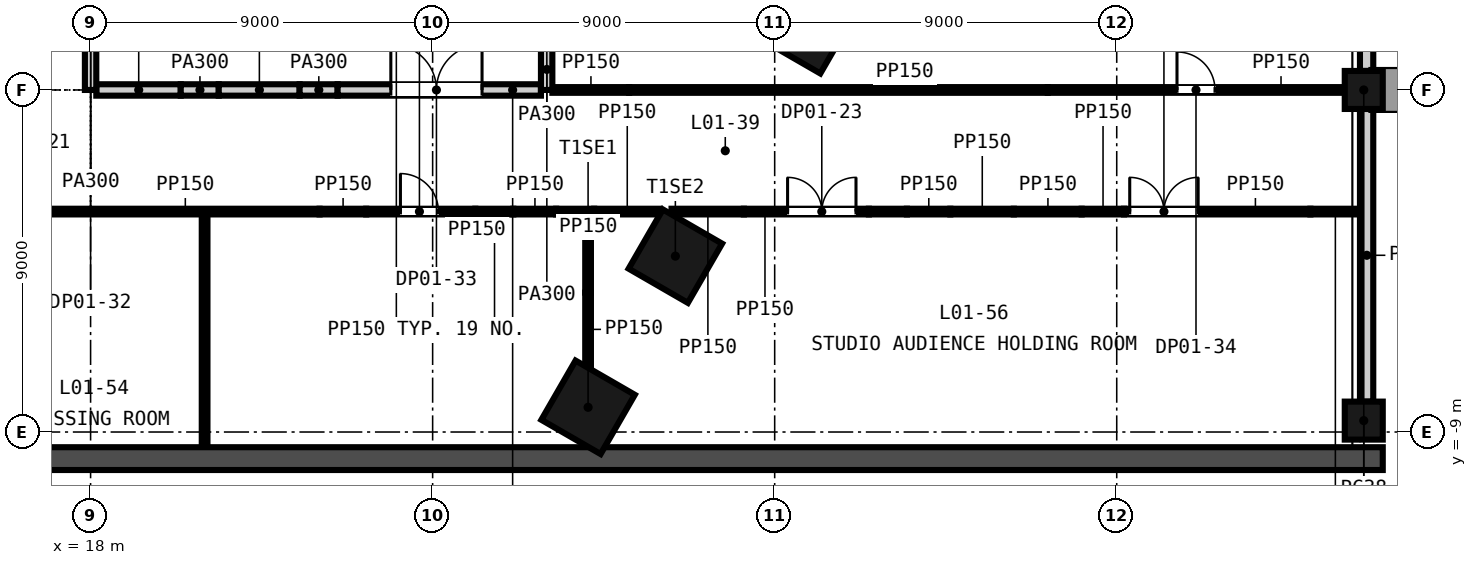
"""IFC4 building model, lengths in metres.
Left out: names, types, materials, properties, quantities, classifications, styles, units other than length and angle.
Written with IfcOpenShell. Run it as: python <this file> out.ifc"""

import sys

from ifc_helpers import new_model, si_unit, direction, frame, frame_2d, origin, origin_2d, place, context, subcontext, project, spatial, rectangle, extrude, element, fill, save


model = new_model("IFC4")
c1 = context("Model", 3, precision=1e-05, world=origin(), true_north=direction((0.0, 1.0)))
c2 = subcontext(c1, "Body", "Model", "MODEL_VIEW")
j1 = project(units=[si_unit("LENGTHUNIT", "METRE"), si_unit("PLANEANGLEUNIT", "RADIAN")], contexts=[c1])
p1 = place(None, origin())
s1 = spatial("IfcSite", under=j1, at=p1, CompositionType="ELEMENT")
p2 = place(p1, origin())
s2 = spatial("IfcBuilding", under=s1, at=p2, CompositionType="ELEMENT")
p3 = place(p2, frame((0.0, 0.0, 9.0)))
s3 = spatial("IfcBuildingStorey", under=s2, at=p3, CompositionType="ELEMENT", Elevation=9.0)
for number, where, z_axis, x_axis in (
    (1, (31.09, -8.35, -0.4), (0.0, 0.0, 1.0), (0.5, 0.866, 0.0)),
    (2, (33.387, -4.373, -0.4), (0.0, 0.0, 1.0), (0.5, 0.866, 0.0)),
    (3, (36.872, 1.663, -0.4), (0.0, 0.0, 1.0), (0.5, 0.866, 0.0)),
):
    element("IfcColumn", number, at=place(p3, frame(where, z_axis=z_axis, x_axis=x_axis)), inside=s3, PredefinedType="COLUMN", context=c2, shape_type="SweptSolid", body=[
        extrude(rectangle(XDim=1.8, YDim=1.8, at=origin_2d()), origin(), (0.0, 0.0, 1.0), 9.0),
    ])
for number, where, z_axis, x_axis in (
    (4, (51.5, 0.0, -0.4), (0.0, 0.0, 1.0), (0.0, 1.0, 0.0)),
    (5, (51.5, -8.7, -0.4), (0.0, 0.0, 1.0), (0.0, 1.0, 0.0)),
):
    element("IfcColumn", number, at=place(p3, frame(where, z_axis=z_axis, x_axis=x_axis)), inside=s3, PredefinedType="COLUMN", context=c2, shape_type="SweptSolid", body=[
        extrude(rectangle(XDim=1.0, YDim=1.0, at=origin_2d()), origin(), (0.0, 0.0, 1.0), 9.0),
    ])
p4 = place(p3, frame((-52.0, -9.7, -0.4), z_axis=(0.0, 0.0, 1.0), x_axis=(1.0, 0.0, 0.0)))
e6 = element("IfcWall", 6, at=p4, inside=s3, PredefinedType="SOLIDWALL", context=c2, shape_type="SweptSolid", body=[
    extrude(rectangle(XDim=104.0, YDim=0.6, at=frame_2d((52.0, 0.0))), origin(), (0.0, 0.0, 1.0), 9.0),
])
p5 = place(p3, frame((51.575, -8.2, -0.4), z_axis=(0.0, 0.0, 1.0), x_axis=(0.0, 1.0, 0.0)))
e7 = element("IfcWall", 7, at=p5, inside=s3, PredefinedType="SOLIDWALL", context=c2, shape_type="SweptSolid", body=[
    extrude(rectangle(XDim=7.7, YDim=0.35, at=frame_2d((3.85, 0.0))), origin(), (0.0, 0.0, 1.0), 8.1),
])
p6 = place(p3, frame((51.575, 0.5, -0.4), z_axis=(0.0, 0.0, 1.0), x_axis=(0.0, 1.0, 0.0)))
e8 = element("IfcWall", 8, at=p6, inside=s3, PredefinedType="SOLIDWALL", context=c2, shape_type="SweptSolid", body=[
    extrude(rectangle(XDim=7.75, YDim=0.35, at=frame_2d((3.875, 0.0))), origin(), (0.0, 0.0, 1.0), 8.1),
])
p7 = place(p3, frame((-17.925, -3.2, 0.0), z_axis=(0.0, 0.0, 1.0), x_axis=(1.0, 0.0, 0.0)))
e9 = element("IfcWall", 9, at=p7, inside=s3, PredefinedType="PARTITIONING", context=c2, shape_type="SweptSolid", body=[
    extrude(rectangle(XDim=41.95, YDim=0.15, at=frame_2d((20.975, 0.0))), origin(), (0.0, 0.0, 1.0), 8.6),
])
p8 = place(p7, frame((4.325, 0.0, 0.0)))
e10 = element("IfcOpeningElement", 10, at=p8, cuts=e9, PredefinedType="OPENING", context=c2, shape_type="SweptSolid", body=[
    extrude(rectangle(XDim=1.0, YDim=2.1, at=frame_2d((0.5, 1.05))), frame((0.0, 0.085, 0.0), z_axis=(0.0, -1.0, 0.0), x_axis=(1.0, 0.0, 0.0)), (0.0, 0.0, 1.0), 0.17),
])
p9 = place(p7, frame((11.325, 0.0, 0.0)))
e11 = element("IfcOpeningElement", 11, at=p9, cuts=e9, PredefinedType="OPENING", context=c2, shape_type="SweptSolid", body=[
    extrude(rectangle(XDim=1.0, YDim=2.1, at=frame_2d((0.5, 1.05))), frame((0.0, 0.085, 0.0), z_axis=(0.0, -1.0, 0.0), x_axis=(1.0, 0.0, 0.0)), (0.0, 0.0, 1.0), 0.17),
])
p10 = place(p7, frame((17.325, 0.0, 0.0)))
e12 = element("IfcOpeningElement", 12, at=p10, cuts=e9, PredefinedType="OPENING", context=c2, shape_type="SweptSolid", body=[
    extrude(rectangle(XDim=1.0, YDim=2.1, at=frame_2d((0.5, 1.05))), frame((0.0, 0.085, 0.0), z_axis=(0.0, -1.0, 0.0), x_axis=(1.0, 0.0, 0.0)), (0.0, 0.0, 1.0), 0.17),
])
p11 = place(p7, frame((21.825, 0.0, 0.0)))
e13 = element("IfcOpeningElement", 13, at=p11, cuts=e9, PredefinedType="OPENING", context=c2, shape_type="SweptSolid", body=[
    extrude(rectangle(XDim=1.0, YDim=2.1, at=frame_2d((0.5, 1.05))), frame((0.0, 0.085, 0.0), z_axis=(0.0, -1.0, 0.0), x_axis=(1.0, 0.0, 0.0)), (0.0, 0.0, 1.0), 0.17),
])
p12 = place(p7, frame((24.825, 0.0, 0.0)))
e14 = element("IfcOpeningElement", 14, at=p12, cuts=e9, PredefinedType="OPENING", context=c2, shape_type="SweptSolid", body=[
    extrude(rectangle(XDim=1.0, YDim=2.1, at=frame_2d((0.5, 1.05))), frame((0.0, 0.085, 0.0), z_axis=(0.0, -1.0, 0.0), x_axis=(1.0, 0.0, 0.0)), (0.0, 0.0, 1.0), 0.17),
])
p13 = place(p7, frame((29.325, 0.0, 0.0)))
e15 = element("IfcOpeningElement", 15, at=p13, cuts=e9, PredefinedType="OPENING", context=c2, shape_type="SweptSolid", body=[
    extrude(rectangle(XDim=1.0, YDim=2.1, at=frame_2d((0.5, 1.05))), frame((0.0, 0.085, 0.0), z_axis=(0.0, -1.0, 0.0), x_axis=(1.0, 0.0, 0.0)), (0.0, 0.0, 1.0), 0.17),
])
p14 = place(p7, frame((33.825, 0.0, 0.0)))
e16 = element("IfcOpeningElement", 16, at=p14, cuts=e9, PredefinedType="OPENING", context=c2, shape_type="SweptSolid", body=[
    extrude(rectangle(XDim=1.0, YDim=2.1, at=frame_2d((0.5, 1.05))), frame((0.0, 0.085, 0.0), z_axis=(0.0, -1.0, 0.0), x_axis=(1.0, 0.0, 0.0)), (0.0, 0.0, 1.0), 0.17),
])
p15 = place(p3, frame((24.025, -3.2, 0.0), z_axis=(0.0, 0.0, 1.0), x_axis=(1.0, 0.0, 0.0)))
e17 = element("IfcWall", 17, at=p15, inside=s3, PredefinedType="PARTITIONING", context=c2, shape_type="SweptSolid", body=[
    extrude(rectangle(XDim=1.227, YDim=0.15, at=frame_2d((0.614, 0.0))), origin(), (0.0, 0.0, 1.0), 7.851),
])
p16 = place(p3, frame((25.252, -3.2, 0.0), z_axis=(0.0, 0.0, 1.0), x_axis=(1.0, 0.0, 0.0)))
e18 = element("IfcWall", 18, at=p16, inside=s3, PredefinedType="PARTITIONING", context=c2, shape_type="SweptSolid", body=[
    extrude(rectangle(XDim=2.871, YDim=0.15, at=frame_2d((1.436, 0.0))), origin(), (0.0, 0.0, 1.0), 8.6),
])
p17 = place(p16, frame((0.9, 0.0, 0.0)))
e19 = element("IfcOpeningElement", 19, at=p17, cuts=e18, PredefinedType="OPENING", context=c2, shape_type="SweptSolid", body=[
    extrude(rectangle(XDim=1.0, YDim=2.1, at=frame_2d((0.5, 1.05))), frame((0.0, 0.085, 0.0), z_axis=(0.0, -1.0, 0.0), x_axis=(1.0, 0.0, 0.0)), (0.0, 0.0, 1.0), 0.17),
])
p18 = place(p3, frame((28.123, -3.2, 0.0), z_axis=(0.0, 0.0, 1.0), x_axis=(1.0, 0.0, 0.0)))
e20 = element("IfcWall", 20, at=p18, inside=s3, PredefinedType="PARTITIONING", context=c2, shape_type="SweptSolid", body=[
    extrude(rectangle(XDim=1.0, YDim=0.15, at=frame_2d((0.5, 0.0))), origin(), (0.0, 0.0, 1.0), 7.851),
])
p19 = place(p3, frame((29.123, -3.2, 0.0), z_axis=(0.0, 0.0, 1.0), x_axis=(1.0, 0.0, 0.0)))
e21 = element("IfcWall", 21, at=p19, inside=s3, PredefinedType="PARTITIONING", context=c2, shape_type="SweptSolid", body=[
    extrude(rectangle(XDim=1.127, YDim=0.15, at=frame_2d((0.563, 0.0))), origin(), (0.0, 0.0, 1.0), 8.6),
])
p20 = place(p3, frame((30.25, -3.2, 0.0), z_axis=(0.0, 0.0, 1.0), x_axis=(1.0, 0.0, 0.0)))
e22 = element("IfcWall", 22, at=p20, inside=s3, PredefinedType="PARTITIONING", context=c2, shape_type="SweptSolid", body=[
    extrude(rectangle(XDim=1.0, YDim=0.15, at=frame_2d((0.5, 0.0))), origin(), (0.0, 0.0, 1.0), 7.841),
])
p21 = place(p3, frame((31.25, -3.2, 0.0), z_axis=(0.0, 0.0, 1.0), x_axis=(1.0, 0.0, 0.0)))
e23 = element("IfcWall", 23, at=p21, inside=s3, PredefinedType="PARTITIONING", context=c2, shape_type="SweptSolid", body=[
    extrude(rectangle(XDim=1.731, YDim=0.15, at=frame_2d((0.865, 0.0))), origin(), (0.0, 0.0, 1.0), 7.841),
])
p22 = place(p3, frame((33.286, -3.2, 0.0), z_axis=(0.0, 0.0, 1.0), x_axis=(1.0, 0.0, 0.0)))
e24 = element("IfcWall", 24, at=p22, inside=s3, PredefinedType="PARTITIONING", context=c2, shape_type="SweptSolid", body=[
    extrude(rectangle(XDim=1.904, YDim=0.15, at=frame_2d((0.952, 0.0))), origin(), (0.0, 0.0, 1.0), 7.6),
])
p23 = place(p3, frame((35.189, -3.2, 0.0), z_axis=(0.0, 0.0, 1.0), x_axis=(1.0, 0.0, 0.0)))
e25 = element("IfcWall", 25, at=p23, inside=s3, PredefinedType="PARTITIONING", context=c2, shape_type="SweptSolid", body=[
    extrude(rectangle(XDim=3.289, YDim=0.15, at=frame_2d((1.645, 0.0))), origin(), (0.0, 0.0, 1.0), 8.6),
])
p24 = place(p23, frame((1.15, 0.0, 0.0)))
e26 = element("IfcOpeningElement", 26, at=p24, cuts=e25, PredefinedType="OPENING", context=c2, shape_type="SweptSolid", body=[
    extrude(rectangle(XDim=1.8, YDim=2.4, at=frame_2d((0.9, 1.2))), frame((0.0, 0.085, 0.0), z_axis=(0.0, -1.0, 0.0), x_axis=(1.0, 0.0, 0.0)), (0.0, 0.0, 1.0), 0.17),
])
p25 = place(p3, frame((38.479, -3.2, 0.0), z_axis=(0.0, 0.0, 1.0), x_axis=(1.0, 0.0, 0.0)))
e27 = element("IfcWall", 27, at=p25, inside=s3, PredefinedType="PARTITIONING", context=c2, shape_type="SweptSolid", body=[
    extrude(rectangle(XDim=1.0, YDim=0.15, at=frame_2d((0.5, 0.0))), origin(), (0.0, 0.0, 1.0), 7.921),
])
p26 = place(p3, frame((39.479, -3.2, 0.0), z_axis=(0.0, 0.0, 1.0), x_axis=(1.0, 0.0, 0.0)))
e28 = element("IfcWall", 28, at=p26, inside=s3, PredefinedType="PARTITIONING", context=c2, shape_type="SweptSolid", body=[
    extrude(rectangle(XDim=1.143, YDim=0.15, at=frame_2d((0.572, 0.0))), origin(), (0.0, 0.0, 1.0), 7.841),
])
p27 = place(p3, frame((40.622, -3.2, 0.0), z_axis=(0.0, 0.0, 1.0), x_axis=(1.0, 0.0, 0.0)))
e29 = element("IfcWall", 29, at=p27, inside=s3, PredefinedType="PARTITIONING", context=c2, shape_type="SweptSolid", body=[
    extrude(rectangle(XDim=1.67, YDim=0.15, at=frame_2d((0.835, 0.0))), origin(), (0.0, 0.0, 1.0), 7.765),
])
p28 = place(p3, frame((42.292, -3.2, 0.0), z_axis=(0.0, 0.0, 1.0), x_axis=(1.0, 0.0, 0.0)))
e30 = element("IfcWall", 30, at=p28, inside=s3, PredefinedType="PARTITIONING", context=c2, shape_type="SweptSolid", body=[
    extrude(rectangle(XDim=1.785, YDim=0.15, at=frame_2d((0.893, 0.0))), origin(), (0.0, 0.0, 1.0), 8.6),
])
p29 = place(p3, frame((44.077, -3.2, 0.0), z_axis=(0.0, 0.0, 1.0), x_axis=(1.0, 0.0, 0.0)))
e31 = element("IfcWall", 31, at=p29, inside=s3, PredefinedType="PARTITIONING", context=c2, shape_type="SweptSolid", body=[
    extrude(rectangle(XDim=1.115, YDim=0.15, at=frame_2d((0.557, 0.0))), origin(), (0.0, 0.0, 1.0), 7.841),
])
p30 = place(p3, frame((45.192, -3.2, 0.0), z_axis=(0.0, 0.0, 1.0), x_axis=(1.0, 0.0, 0.0)))
e32 = element("IfcWall", 32, at=p30, inside=s3, PredefinedType="PARTITIONING", context=c2, shape_type="SweptSolid", body=[
    extrude(rectangle(XDim=4.904, YDim=0.15, at=frame_2d((2.452, 0.0))), origin(), (0.0, 0.0, 1.0), 8.6),
])
p31 = place(p30, frame((0.15, 0.0, 0.0)))
e33 = element("IfcOpeningElement", 33, at=p31, cuts=e32, PredefinedType="OPENING", context=c2, shape_type="SweptSolid", body=[
    extrude(rectangle(XDim=1.8, YDim=2.4, at=frame_2d((0.9, 1.2))), frame((0.0, 0.085, 0.0), z_axis=(0.0, -1.0, 0.0), x_axis=(1.0, 0.0, 0.0)), (0.0, 0.0, 1.0), 0.17),
])
p32 = place(p3, frame((50.096, -3.2, 0.0), z_axis=(0.0, 0.0, 1.0), x_axis=(1.0, 0.0, 0.0)))
e34 = element("IfcWall", 34, at=p32, inside=s3, PredefinedType="PARTITIONING", context=c2, shape_type="SweptSolid", body=[
    extrude(rectangle(XDim=1.304, YDim=0.15, at=frame_2d((0.652, 0.0))), origin(), (0.0, 0.0, 1.0), 7.841),
])
p33 = place(p3, frame((18.15, 0.0, 0.0), z_axis=(0.0, 0.0, 1.0), x_axis=(1.0, 0.0, 0.0)))
e35 = element("IfcWall", 35, at=p33, inside=s3, PredefinedType="PARTITIONING", context=c2, shape_type="SweptSolid", body=[
    extrude(rectangle(XDim=2.222, YDim=0.3, at=frame_2d((1.111, 0.0))), origin(), (0.0, 0.0, 1.0), 8.6),
])
p34 = place(p3, frame((20.372, 0.0, 0.0), z_axis=(0.0, 0.0, 1.0), x_axis=(1.0, 0.0, 0.0)))
e36 = element("IfcWall", 36, at=p34, inside=s3, PredefinedType="PARTITIONING", context=c2, shape_type="SweptSolid", body=[
    extrude(rectangle(XDim=1.0, YDim=0.3, at=frame_2d((0.5, 0.0))), origin(), (0.0, 0.0, 1.0), 7.765),
])
p35 = place(p3, frame((21.372, 0.0, 0.0), z_axis=(0.0, 0.0, 1.0), x_axis=(1.0, 0.0, 0.0)))
e37 = element("IfcWall", 37, at=p35, inside=s3, PredefinedType="PARTITIONING", context=c2, shape_type="SweptSolid", body=[
    extrude(rectangle(XDim=2.128, YDim=0.3, at=frame_2d((1.064, 0.0))), origin(), (0.0, 0.0, 1.0), 8.6),
])
p36 = place(p3, frame((23.5, 0.0, 0.0), z_axis=(0.0, 0.0, 1.0), x_axis=(1.0, 0.0, 0.0)))
e38 = element("IfcWall", 38, at=p36, inside=s3, PredefinedType="PARTITIONING", context=c2, shape_type="SweptSolid", body=[
    extrude(rectangle(XDim=1.0, YDim=0.3, at=frame_2d((0.5, 0.0))), origin(), (0.0, 0.0, 1.0), 7.765),
])
p37 = place(p3, frame((24.5, 0.0, 0.0), z_axis=(0.0, 0.0, 1.0), x_axis=(1.0, 0.0, 0.0)))
e39 = element("IfcWall", 39, at=p37, inside=s3, PredefinedType="PARTITIONING", context=c2, shape_type="SweptSolid", body=[
    extrude(rectangle(XDim=5.35, YDim=0.3, at=frame_2d((2.675, 0.0))), origin(), (0.0, 0.0, 1.0), 8.6),
])
p38 = place(p37, frame((1.4, 0.0, 0.0)))
e40 = element("IfcOpeningElement", 40, at=p38, cuts=e39, PredefinedType="OPENING", context=c2, shape_type="SweptSolid", body=[
    extrude(rectangle(XDim=2.4, YDim=2.4, at=frame_2d((1.2, 1.2))), frame((0.0, 0.16, 0.0), z_axis=(0.0, -1.0, 0.0), x_axis=(1.0, 0.0, 0.0)), (0.0, 0.0, 1.0), 0.32),
])
p39 = place(p3, frame((30.15, 0.0, 0.0), z_axis=(0.0, 0.0, 1.0), x_axis=(1.0, 0.0, 0.0)))
e41 = element("IfcWall", 41, at=p39, inside=s3, PredefinedType="PARTITIONING", context=c2, shape_type="SweptSolid", body=[
    extrude(rectangle(XDim=2.021, YDim=0.15, at=frame_2d((1.01, 0.0))), origin(), (0.0, 0.0, 1.0), 8.6),
])
p40 = place(p3, frame((32.171, 0.0, 0.0), z_axis=(0.0, 0.0, 1.0), x_axis=(1.0, 0.0, 0.0)))
e42 = element("IfcWall", 42, at=p40, inside=s3, PredefinedType="PARTITIONING", context=c2, shape_type="SweptSolid", body=[
    extrude(rectangle(XDim=11.015, YDim=0.15, at=frame_2d((5.508, 0.0))), origin(), (0.0, 0.0, 1.0), 7.6),
])
p41 = place(p3, frame((43.186, 0.0, 0.0), z_axis=(0.0, 0.0, 1.0), x_axis=(1.0, 0.0, 0.0)))
e43 = element("IfcWall", 43, at=p41, inside=s3, PredefinedType="PARTITIONING", context=c2, shape_type="SweptSolid", body=[
    extrude(rectangle(XDim=7.814, YDim=0.15, at=frame_2d((3.907, 0.0))), origin(), (0.0, 0.0, 1.0), 8.6),
])
p42 = place(p41, frame((3.4, 0.0, 0.0)))
e44 = element("IfcOpeningElement", 44, at=p42, cuts=e43, PredefinedType="OPENING", context=c2, shape_type="SweptSolid", body=[
    extrude(rectangle(XDim=1.0, YDim=2.1, at=frame_2d((0.5, 1.05))), frame((0.0, 0.085, 0.0), z_axis=(0.0, -1.0, 0.0), x_axis=(1.0, 0.0, 0.0)), (0.0, 0.0, 1.0), 0.17),
])
p43 = place(p3, frame((18.0, 0.0, 0.0), z_axis=(0.0, 0.0, 1.0), x_axis=(0.0, 1.0, 0.0)))
e45 = element("IfcWall", 45, at=p43, inside=s3, PredefinedType="PARTITIONING", context=c2, shape_type="SweptSolid", body=[
    extrude(rectangle(XDim=7.0, YDim=0.3, at=frame_2d((3.5, 0.0))), origin(), (0.0, 0.0, 1.0), 8.6),
])
p44 = place(p43, frame((2.4, 0.0, 0.0)))
e46 = element("IfcOpeningElement", 46, at=p44, cuts=e45, PredefinedType="OPENING", context=c2, shape_type="SweptSolid", body=[
    extrude(rectangle(XDim=2.4, YDim=2.4, at=frame_2d((1.2, 1.2))), frame((0.0, 0.16, 0.0), z_axis=(0.0, -1.0, 0.0), x_axis=(1.0, 0.0, 0.0)), (0.0, 0.0, 1.0), 0.32),
])
p45 = place(p3, frame((21.0, -9.4, 0.0), z_axis=(0.0, 0.0, 1.0), x_axis=(0.0, 1.0, 0.0)))
e47 = element("IfcWall", 47, at=p45, inside=s3, PredefinedType="PARTITIONING", context=c2, shape_type="SweptSolid", body=[
    extrude(rectangle(XDim=6.125, YDim=0.15, at=frame_2d((3.062, 0.0))), origin(), (0.0, 0.0, 1.0), 7.765),
])
p46 = place(p3, frame((30.0, 0.0, 0.0), z_axis=(0.0, 0.0, 1.0), x_axis=(0.0, 1.0, 0.0)))
e48 = element("IfcWall", 48, at=p46, inside=s3, PredefinedType="PARTITIONING", context=c2, shape_type="SweptSolid", body=[
    extrude(rectangle(XDim=1.08, YDim=0.3, at=frame_2d((0.54, 0.0))), origin(), (0.0, 0.0, 1.0), 7.921),
])
p47 = place(p3, frame((31.09, -7.267, 0.0), z_axis=(0.0, 0.0, 1.0), x_axis=(0.0, 1.0, 0.0)))
e49 = element("IfcWall", 49, at=p47, inside=s3, PredefinedType="PARTITIONING", context=c2, shape_type="SweptSolid", body=[
    extrude(rectangle(XDim=1.935, YDim=0.15, at=frame_2d((0.968, 0.0))), origin(), (0.0, 0.0, 1.0), 8.0),
])
p48 = place(p3, frame((31.09, -5.332, 0.0), z_axis=(0.0, 0.0, 1.0), x_axis=(0.0, 1.0, 0.0)))
e50 = element("IfcWall", 50, at=p48, inside=s3, PredefinedType="PARTITIONING", context=c2, shape_type="SweptSolid", body=[
    extrude(rectangle(XDim=2.057, YDim=0.15, at=frame_2d((1.029, 0.0))), origin(), (0.0, 0.0, 1.0), 7.841),
])
p49 = place(p17, origin())
e51 = element("IfcDoor", 51, at=p49, inside=s3, OperationType="SINGLE_SWING_LEFT", PredefinedType="DOOR", context=c2, shape_type="SweptSolid", body=[
    extrude(rectangle(XDim=1.0, YDim=2.1, at=frame_2d((0.5, 1.05))), frame((0.0, 0.025, 0.0), z_axis=(0.0, -1.0, 0.0), x_axis=(1.0, 0.0, 0.0)), (0.0, 0.0, 1.0), 0.05),
])
fill(e19, e51)
p50 = place(p24, origin())
e52 = element("IfcDoor", 52, at=p50, inside=s3, OperationType="SINGLE_SWING_LEFT", PredefinedType="DOOR", context=c2, shape_type="SweptSolid", body=[
    extrude(rectangle(XDim=1.8, YDim=2.4, at=frame_2d((0.9, 1.2))), frame((0.0, 0.025, 0.0), z_axis=(0.0, -1.0, 0.0), x_axis=(1.0, 0.0, 0.0)), (0.0, 0.0, 1.0), 0.05),
])
fill(e26, e52)
p51 = place(p31, origin())
e53 = element("IfcDoor", 53, at=p51, inside=s3, OperationType="SINGLE_SWING_LEFT", PredefinedType="DOOR", context=c2, shape_type="SweptSolid", body=[
    extrude(rectangle(XDim=1.8, YDim=2.4, at=frame_2d((0.9, 1.2))), frame((0.0, 0.025, 0.0), z_axis=(0.0, -1.0, 0.0), x_axis=(1.0, 0.0, 0.0)), (0.0, 0.0, 1.0), 0.05),
])
fill(e33, e53)
p52 = place(p38, origin())
e54 = element("IfcDoor", 54, at=p52, inside=s3, OperationType="SINGLE_SWING_LEFT", PredefinedType="DOOR", context=c2, shape_type="SweptSolid", body=[
    extrude(rectangle(XDim=2.4, YDim=2.4, at=frame_2d((1.2, 1.2))), frame((0.0, 0.025, 0.0), z_axis=(0.0, -1.0, 0.0), x_axis=(1.0, 0.0, 0.0)), (0.0, 0.0, 1.0), 0.05),
])
fill(e40, e54)
p53 = place(p42, origin())
e55 = element("IfcDoor", 55, at=p53, inside=s3, OperationType="SINGLE_SWING_LEFT", PredefinedType="DOOR", context=c2, shape_type="SweptSolid", body=[
    extrude(rectangle(XDim=1.0, YDim=2.1, at=frame_2d((0.5, 1.05))), frame((0.0, 0.025, 0.0), z_axis=(0.0, -1.0, 0.0), x_axis=(1.0, 0.0, 0.0)), (0.0, 0.0, 1.0), 0.05),
])
fill(e44, e55)
save(model, sys.argv[1])
